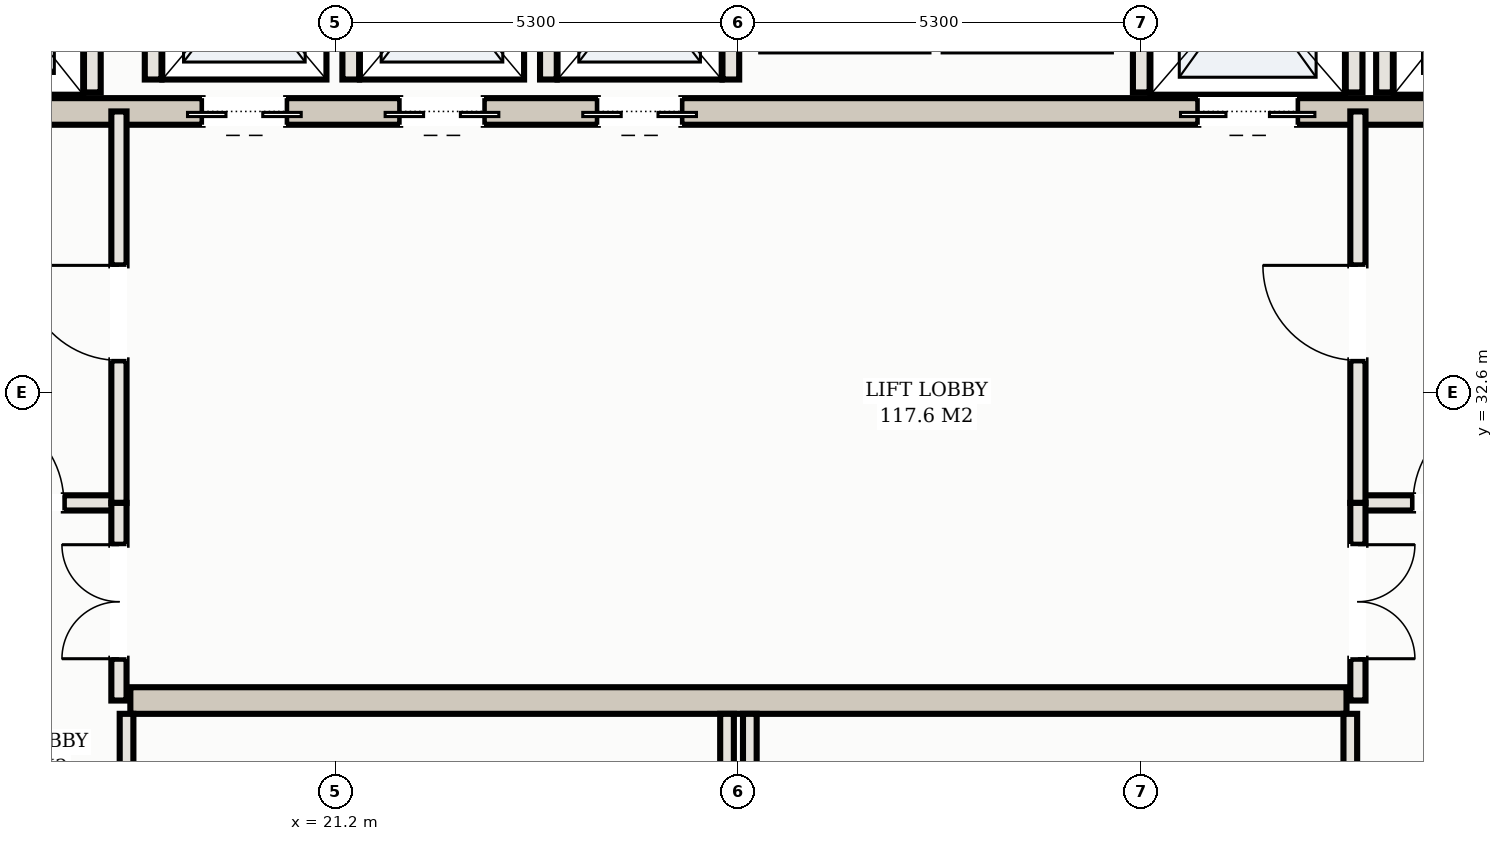
"""IFC4 building model, lengths in metres.
Left out: names, types, materials, properties, quantities, classifications, styles, units other than length and angle.
Written with IfcOpenShell. Run it as: python <this file> out.ifc"""

import sys

from ifc_helpers import new_model, si_unit, direction, frame, frame_2d, origin, place, context, subcontext, project, spatial, rectangle, extrude, element, fill, save


model = new_model("IFC4")
c1 = context("Model", 3, precision=1e-05, world=origin(), true_north=direction((0.0, 1.0)))
c2 = subcontext(c1, "Body", "Model", "MODEL_VIEW")
j1 = project(units=[si_unit("LENGTHUNIT", "METRE"), si_unit("PLANEANGLEUNIT", "RADIAN")], contexts=[c1])
p1 = place(None, origin())
s1 = spatial("IfcSite", under=j1, at=p1, CompositionType="ELEMENT")
p2 = place(p1, origin())
s2 = spatial("IfcBuilding", under=s1, at=p2, CompositionType="ELEMENT")
p3 = place(p2, frame((0.0, 0.0, 246.2)))
s3 = spatial("IfcBuildingStorey", under=s2, at=p3, CompositionType="ELEMENT", Elevation=246.2)
p4 = place(p3, frame((15.5, 36.3, 0.0), z_axis=(0.0, 0.0, 1.0), x_axis=(1.0, 0.0, 0.0)))
e1 = element("IfcWall", 1, at=p4, inside=s3, PredefinedType="SHEAR", context=c2, shape_type="SweptSolid", body=[
    extrude(rectangle(XDim=22.0, YDim=0.35, at=frame_2d((11.0, 0.0))), origin(), (0.0, 0.0, 1.0), 3.11),
])
p5 = place(p4, frame((0.65, 0.0, 0.0)))
e2 = element("IfcOpeningElement", 2, at=p5, cuts=e1, PredefinedType="OPENING", context=c2, shape_type="SweptSolid", body=[
    extrude(rectangle(XDim=1.1, YDim=2.15, at=frame_2d((0.55, 1.075))), frame((0.0, 0.185, 0.0), z_axis=(0.0, -1.0, 0.0), x_axis=(1.0, 0.0, 0.0)), (0.0, 0.0, 1.0), 0.37),
])
p6 = place(p4, frame((20.25, 0.0, 0.0)))
e3 = element("IfcOpeningElement", 3, at=p6, cuts=e1, PredefinedType="OPENING", context=c2, shape_type="SweptSolid", body=[
    extrude(rectangle(XDim=1.1, YDim=2.15, at=frame_2d((0.55, 1.075))), frame((0.0, 0.185, 0.0), z_axis=(0.0, -1.0, 0.0), x_axis=(1.0, 0.0, 0.0)), (0.0, 0.0, 1.0), 0.37),
])
p7 = place(p4, frame((17.05, 0.0, 0.0)))
e4 = element("IfcOpeningElement", 4, at=p7, cuts=e1, PredefinedType="OPENING", context=c2, shape_type="SweptSolid", body=[
    extrude(rectangle(XDim=1.3, YDim=2.2, at=frame_2d((0.65, 1.1))), frame((0.0, 0.185, 0.0), z_axis=(0.0, -1.0, 0.0), x_axis=(1.0, 0.0, 0.0)), (0.0, 0.0, 1.0), 0.37),
])
p8 = place(p4, frame((3.95, 0.0, 0.0)))
e5 = element("IfcOpeningElement", 5, at=p8, cuts=e1, PredefinedType="OPENING", context=c2, shape_type="SweptSolid", body=[
    extrude(rectangle(XDim=1.1, YDim=2.15, at=frame_2d((0.55, 1.075))), frame((0.0, 0.185, 0.0), z_axis=(0.0, -1.0, 0.0), x_axis=(1.0, 0.0, 0.0)), (0.0, 0.0, 1.0), 0.37),
])
p9 = place(p4, frame((6.55, 0.0, 0.0)))
e6 = element("IfcOpeningElement", 6, at=p9, cuts=e1, PredefinedType="OPENING", context=c2, shape_type="SweptSolid", body=[
    extrude(rectangle(XDim=1.1, YDim=2.15, at=frame_2d((0.55, 1.075))), frame((0.0, 0.185, 0.0), z_axis=(0.0, -1.0, 0.0), x_axis=(1.0, 0.0, 0.0)), (0.0, 0.0, 1.0), 0.37),
])
p10 = place(p4, frame((9.15, 0.0, 0.0)))
e7 = element("IfcOpeningElement", 7, at=p10, cuts=e1, PredefinedType="OPENING", context=c2, shape_type="SweptSolid", body=[
    extrude(rectangle(XDim=1.1, YDim=2.15, at=frame_2d((0.55, 1.075))), frame((0.0, 0.185, 0.0), z_axis=(0.0, -1.0, 0.0), x_axis=(1.0, 0.0, 0.0)), (0.0, 0.0, 1.0), 0.37),
])
p11 = place(p3, frame((18.5, 28.55, 0.0), z_axis=(0.0, 0.0, 1.0), x_axis=(1.0, 0.0, 0.0)))
e8 = element("IfcWall", 8, at=p11, inside=s3, PredefinedType="SHEAR", context=c2, shape_type="SweptSolid", body=[
    extrude(rectangle(XDim=16.0, YDim=0.35, at=frame_2d((8.0, 0.0))), origin(), (0.0, 0.0, 1.0), 3.11),
])
for number, where, z_axis, x_axis in (
    (9, (18.0, 36.55, 0.0), (0.0, 0.0, 1.0), (0.0, 1.0, 0.0)),
    (10, (35.0, 36.55, 0.0), (0.0, 0.0, 1.0), (0.0, 1.0, 0.0)),
    (11, (31.8, 36.55, 0.0), (0.0, 0.0, 1.0), (0.0, 1.0, 0.0)),
    (12, (34.6, 36.55, 0.0), (0.0, 0.0, 1.0), (0.0, 1.0, 0.0)),
):
    element("IfcWall", number, at=place(p3, frame(where, z_axis=z_axis, x_axis=x_axis)), inside=s3, PredefinedType="SOLIDWALL", context=c2, shape_type="SweptSolid", body=[
        extrude(rectangle(XDim=2.93, YDim=0.22, at=frame_2d((1.465, 0.0))), origin(), (0.0, 0.0, 1.0), 3.11),
    ])
for number, where, z_axis, x_axis in (
    (13, (18.8, 36.72, 0.0), (0.0, 0.0, 1.0), (0.0, 1.0, 0.0)),
    (14, (21.4, 36.72, 0.0), (0.0, 0.0, 1.0), (0.0, 1.0, 0.0)),
    (15, (24.0, 36.72, 0.0), (0.0, 0.0, 1.0), (0.0, 1.0, 0.0)),
    (16, (26.4, 36.72, 0.0), (0.0, 0.0, 1.0), (0.0, 1.0, 0.0)),
):
    element("IfcWall", number, at=place(p3, frame(where, z_axis=z_axis, x_axis=x_axis)), inside=s3, PredefinedType="SOLIDWALL", context=c2, shape_type="SweptSolid", body=[
        extrude(rectangle(XDim=2.56, YDim=0.22, at=frame_2d((1.28, 0.0))), origin(), (0.0, 0.0, 1.0), 3.11),
    ])
p12 = place(p3, frame((15.1, 31.15, 0.0), z_axis=(0.0, 0.0, 1.0), x_axis=(1.0, 0.0, 0.0)))
e17 = element("IfcWall", 17, at=p12, inside=s3, PredefinedType="PARTITIONING", context=c2, shape_type="SweptSolid", body=[
    extrude(rectangle(XDim=3.25, YDim=0.2, at=frame_2d((1.625, 0.0))), origin(), (0.0, 0.0, 1.0), 2.45),
])
p13 = place(p12, frame((1.275, 0.0, 0.0)))
e18 = element("IfcOpeningElement", 18, at=p13, cuts=e17, PredefinedType="OPENING", context=c2, shape_type="SweptSolid", body=[
    extrude(rectangle(XDim=1.25, YDim=2.2, at=frame_2d((0.625, 1.1))), frame((0.0, 0.11, 0.0), z_axis=(0.0, -1.0, 0.0), x_axis=(1.0, 0.0, 0.0)), (0.0, 0.0, 1.0), 0.22),
])
p14 = place(p3, frame((18.35, 31.15, 0.0), z_axis=(0.0, 0.0, 1.0), x_axis=(0.0, 1.0, 0.0)))
e19 = element("IfcWall", 19, at=p14, inside=s3, PredefinedType="PARTITIONING", context=c2, shape_type="SweptSolid", body=[
    extrude(rectangle(XDim=5.15, YDim=0.2, at=frame_2d((2.575, 0.0))), origin(), (0.0, 0.0, 1.0), 2.45),
])
p15 = place(p14, frame((1.875, 0.0, 0.0)))
e20 = element("IfcOpeningElement", 20, at=p15, cuts=e19, PredefinedType="OPENING", context=c2, shape_type="SweptSolid", body=[
    extrude(rectangle(XDim=1.25, YDim=2.2, at=frame_2d((0.625, 1.1))), frame((0.0, 0.11, 0.0), z_axis=(0.0, -1.0, 0.0), x_axis=(1.0, 0.0, 0.0)), (0.0, 0.0, 1.0), 0.22),
])
p16 = place(p3, frame((34.65, 31.15, 0.0), z_axis=(0.0, 0.0, 1.0), x_axis=(1.0, 0.0, 0.0)))
e21 = element("IfcWall", 21, at=p16, inside=s3, PredefinedType="PARTITIONING", context=c2, shape_type="SweptSolid", body=[
    extrude(rectangle(XDim=3.25, YDim=0.2, at=frame_2d((1.625, 0.0))), origin(), (0.0, 0.0, 1.0), 2.45),
])
p17 = place(p16, frame((0.725, 0.0, 0.0)))
e22 = element("IfcOpeningElement", 22, at=p17, cuts=e21, PredefinedType="OPENING", context=c2, shape_type="SweptSolid", body=[
    extrude(rectangle(XDim=1.25, YDim=2.2, at=frame_2d((0.625, 1.1))), frame((0.0, 0.11, 0.0), z_axis=(0.0, -1.0, 0.0), x_axis=(1.0, 0.0, 0.0)), (0.0, 0.0, 1.0), 0.22),
])
p18 = place(p3, frame((34.65, 31.15, 0.0), z_axis=(0.0, 0.0, 1.0), x_axis=(0.0, 1.0, 0.0)))
e23 = element("IfcWall", 23, at=p18, inside=s3, PredefinedType="PARTITIONING", context=c2, shape_type="SweptSolid", body=[
    extrude(rectangle(XDim=5.15, YDim=0.2, at=frame_2d((2.575, 0.0))), origin(), (0.0, 0.0, 1.0), 2.45),
])
p19 = place(p18, frame((1.875, 0.0, 0.0)))
e24 = element("IfcOpeningElement", 24, at=p19, cuts=e23, PredefinedType="OPENING", context=c2, shape_type="SweptSolid", body=[
    extrude(rectangle(XDim=1.25, YDim=2.2, at=frame_2d((0.625, 1.1))), frame((0.0, 0.11, 0.0), z_axis=(0.0, -1.0, 0.0), x_axis=(1.0, 0.0, 0.0)), (0.0, 0.0, 1.0), 0.22),
])
p20 = place(p3, frame((18.35, 28.55, 0.0), z_axis=(0.0, 0.0, 1.0), x_axis=(0.0, 1.0, 0.0)))
e25 = element("IfcWall", 25, at=p20, inside=s3, PredefinedType="PARTITIONING", context=c2, shape_type="SweptSolid", body=[
    extrude(rectangle(XDim=2.6, YDim=0.2, at=frame_2d((1.3, 0.0))), origin(), (0.0, 0.0, 1.0), 2.45),
])
p21 = place(p20, frame((0.55, 0.0, 0.0)))
e26 = element("IfcOpeningElement", 26, at=p21, cuts=e25, PredefinedType="OPENING", context=c2, shape_type="SweptSolid", body=[
    extrude(rectangle(XDim=1.5, YDim=2.25, at=frame_2d((0.75, 1.125))), frame((0.0, 0.11, 0.0), z_axis=(0.0, -1.0, 0.0), x_axis=(1.0, 0.0, 0.0)), (0.0, 0.0, 1.0), 0.22),
])
p22 = place(p3, frame((34.65, 28.55, 0.0), z_axis=(0.0, 0.0, 1.0), x_axis=(0.0, 1.0, 0.0)))
e27 = element("IfcWall", 27, at=p22, inside=s3, PredefinedType="PARTITIONING", context=c2, shape_type="SweptSolid", body=[
    extrude(rectangle(XDim=2.6, YDim=0.2, at=frame_2d((1.3, 0.0))), origin(), (0.0, 0.0, 1.0), 2.45),
])
p23 = place(p22, frame((0.55, 0.0, 0.0)))
e28 = element("IfcOpeningElement", 28, at=p23, cuts=e27, PredefinedType="OPENING", context=c2, shape_type="SweptSolid", body=[
    extrude(rectangle(XDim=1.5, YDim=2.25, at=frame_2d((0.75, 1.125))), frame((0.0, 0.11, 0.0), z_axis=(0.0, -1.0, 0.0), x_axis=(1.0, 0.0, 0.0)), (0.0, 0.0, 1.0), 0.22),
])
for number, where, z_axis, x_axis in (
    (29, (18.45, 25.62, 0.0), (0.0, 0.0, 1.0), (0.0, 1.0, 0.0)),
    (30, (26.35, 25.62, 0.0), (0.0, 0.0, 1.0), (0.0, 1.0, 0.0)),
    (31, (26.65, 25.62, 0.0), (0.0, 0.0, 1.0), (0.0, 1.0, 0.0)),
    (32, (34.55, 25.62, 0.0), (0.0, 0.0, 1.0), (0.0, 1.0, 0.0)),
):
    element("IfcWall", number, at=place(p3, frame(where, z_axis=z_axis, x_axis=x_axis)), inside=s3, PredefinedType="PARTITIONING", context=c2, shape_type="SweptSolid", body=[
        extrude(rectangle(XDim=2.755, YDim=0.18, at=frame_2d((1.377, 0.0))), origin(), (0.0, 0.0, 1.0), 2.45),
    ])
p24 = place(p7, frame((1.3, 0.0, 0.0), z_axis=(0.0, 0.0, 1.0), x_axis=(-1.0, 0.0, 0.0)))
e33 = element("IfcDoor", 33, at=p24, inside=s3, OperationType="DOUBLE_DOOR_SLIDING", PredefinedType="DOOR", context=c2, shape_type="SweptSolid", body=[
    extrude(rectangle(XDim=1.3, YDim=2.2, at=frame_2d((0.65, 1.1))), frame((0.0, 0.025, 0.0), z_axis=(0.0, -1.0, 0.0), x_axis=(1.0, 0.0, 0.0)), (0.0, 0.0, 1.0), 0.05),
])
fill(e4, e33)
p25 = place(p8, frame((1.1, 0.0, 0.0), z_axis=(0.0, 0.0, 1.0), x_axis=(-1.0, 0.0, 0.0)))
e34 = element("IfcDoor", 34, at=p25, inside=s3, OperationType="DOUBLE_DOOR_SLIDING", PredefinedType="DOOR", context=c2, shape_type="SweptSolid", body=[
    extrude(rectangle(XDim=1.1, YDim=2.15, at=frame_2d((0.55, 1.075))), frame((0.0, 0.025, 0.0), z_axis=(0.0, -1.0, 0.0), x_axis=(1.0, 0.0, 0.0)), (0.0, 0.0, 1.0), 0.05),
])
fill(e5, e34)
p26 = place(p9, frame((1.1, 0.0, 0.0), z_axis=(0.0, 0.0, 1.0), x_axis=(-1.0, 0.0, 0.0)))
e35 = element("IfcDoor", 35, at=p26, inside=s3, OperationType="DOUBLE_DOOR_SLIDING", PredefinedType="DOOR", context=c2, shape_type="SweptSolid", body=[
    extrude(rectangle(XDim=1.1, YDim=2.15, at=frame_2d((0.55, 1.075))), frame((0.0, 0.025, 0.0), z_axis=(0.0, -1.0, 0.0), x_axis=(1.0, 0.0, 0.0)), (0.0, 0.0, 1.0), 0.05),
])
fill(e6, e35)
p27 = place(p10, frame((1.1, 0.0, 0.0), z_axis=(0.0, 0.0, 1.0), x_axis=(-1.0, 0.0, 0.0)))
e36 = element("IfcDoor", 36, at=p27, inside=s3, OperationType="DOUBLE_DOOR_SLIDING", PredefinedType="DOOR", context=c2, shape_type="SweptSolid", body=[
    extrude(rectangle(XDim=1.1, YDim=2.15, at=frame_2d((0.55, 1.075))), frame((0.0, 0.025, 0.0), z_axis=(0.0, -1.0, 0.0), x_axis=(1.0, 0.0, 0.0)), (0.0, 0.0, 1.0), 0.05),
])
fill(e7, e36)
p28 = place(p13, origin())
e37 = element("IfcDoor", 37, at=p28, inside=s3, OperationType="SINGLE_SWING_LEFT", PredefinedType="DOOR", context=c2, shape_type="SweptSolid", body=[
    extrude(rectangle(XDim=1.25, YDim=2.2, at=frame_2d((0.625, 1.1))), frame((0.0, 0.025, 0.0), z_axis=(0.0, -1.0, 0.0), x_axis=(1.0, 0.0, 0.0)), (0.0, 0.0, 1.0), 0.05),
])
fill(e18, e37)
p29 = place(p15, origin())
e38 = element("IfcDoor", 38, at=p29, inside=s3, OperationType="SINGLE_SWING_RIGHT", PredefinedType="DOOR", context=c2, shape_type="SweptSolid", body=[
    extrude(rectangle(XDim=1.25, YDim=2.2, at=frame_2d((0.625, 1.1))), frame((0.0, 0.025, 0.0), z_axis=(0.0, -1.0, 0.0), x_axis=(1.0, 0.0, 0.0)), (0.0, 0.0, 1.0), 0.05),
])
fill(e20, e38)
p30 = place(p17, origin())
e39 = element("IfcDoor", 39, at=p30, inside=s3, OperationType="SINGLE_SWING_RIGHT", PredefinedType="DOOR", context=c2, shape_type="SweptSolid", body=[
    extrude(rectangle(XDim=1.25, YDim=2.2, at=frame_2d((0.625, 1.1))), frame((0.0, 0.025, 0.0), z_axis=(0.0, -1.0, 0.0), x_axis=(1.0, 0.0, 0.0)), (0.0, 0.0, 1.0), 0.05),
])
fill(e22, e39)
p31 = place(p19, origin())
e40 = element("IfcDoor", 40, at=p31, inside=s3, OperationType="SINGLE_SWING_RIGHT", PredefinedType="DOOR", context=c2, shape_type="SweptSolid", body=[
    extrude(rectangle(XDim=1.25, YDim=2.2, at=frame_2d((0.625, 1.1))), frame((0.0, 0.025, 0.0), z_axis=(0.0, -1.0, 0.0), x_axis=(1.0, 0.0, 0.0)), (0.0, 0.0, 1.0), 0.05),
])
fill(e24, e40)
p32 = place(p21, origin())
e41 = element("IfcDoor", 41, at=p32, inside=s3, OperationType="DOUBLE_DOOR_SINGLE_SWING", PredefinedType="DOOR", context=c2, shape_type="SweptSolid", body=[
    extrude(rectangle(XDim=1.5, YDim=2.25, at=frame_2d((0.75, 1.125))), frame((0.0, 0.025, 0.0), z_axis=(0.0, -1.0, 0.0), x_axis=(1.0, 0.0, 0.0)), (0.0, 0.0, 1.0), 0.05),
])
fill(e26, e41)
p33 = place(p23, frame((1.5, 0.0, 0.0), z_axis=(0.0, 0.0, 1.0), x_axis=(-1.0, 0.0, 0.0)))
e42 = element("IfcDoor", 42, at=p33, inside=s3, OperationType="DOUBLE_DOOR_SINGLE_SWING", PredefinedType="DOOR", context=c2, shape_type="SweptSolid", body=[
    extrude(rectangle(XDim=1.5, YDim=2.25, at=frame_2d((0.75, 1.125))), frame((0.0, 0.025, 0.0), z_axis=(0.0, -1.0, 0.0), x_axis=(1.0, 0.0, 0.0)), (0.0, 0.0, 1.0), 0.05),
])
fill(e28, e42)
save(model, sys.argv[1])
